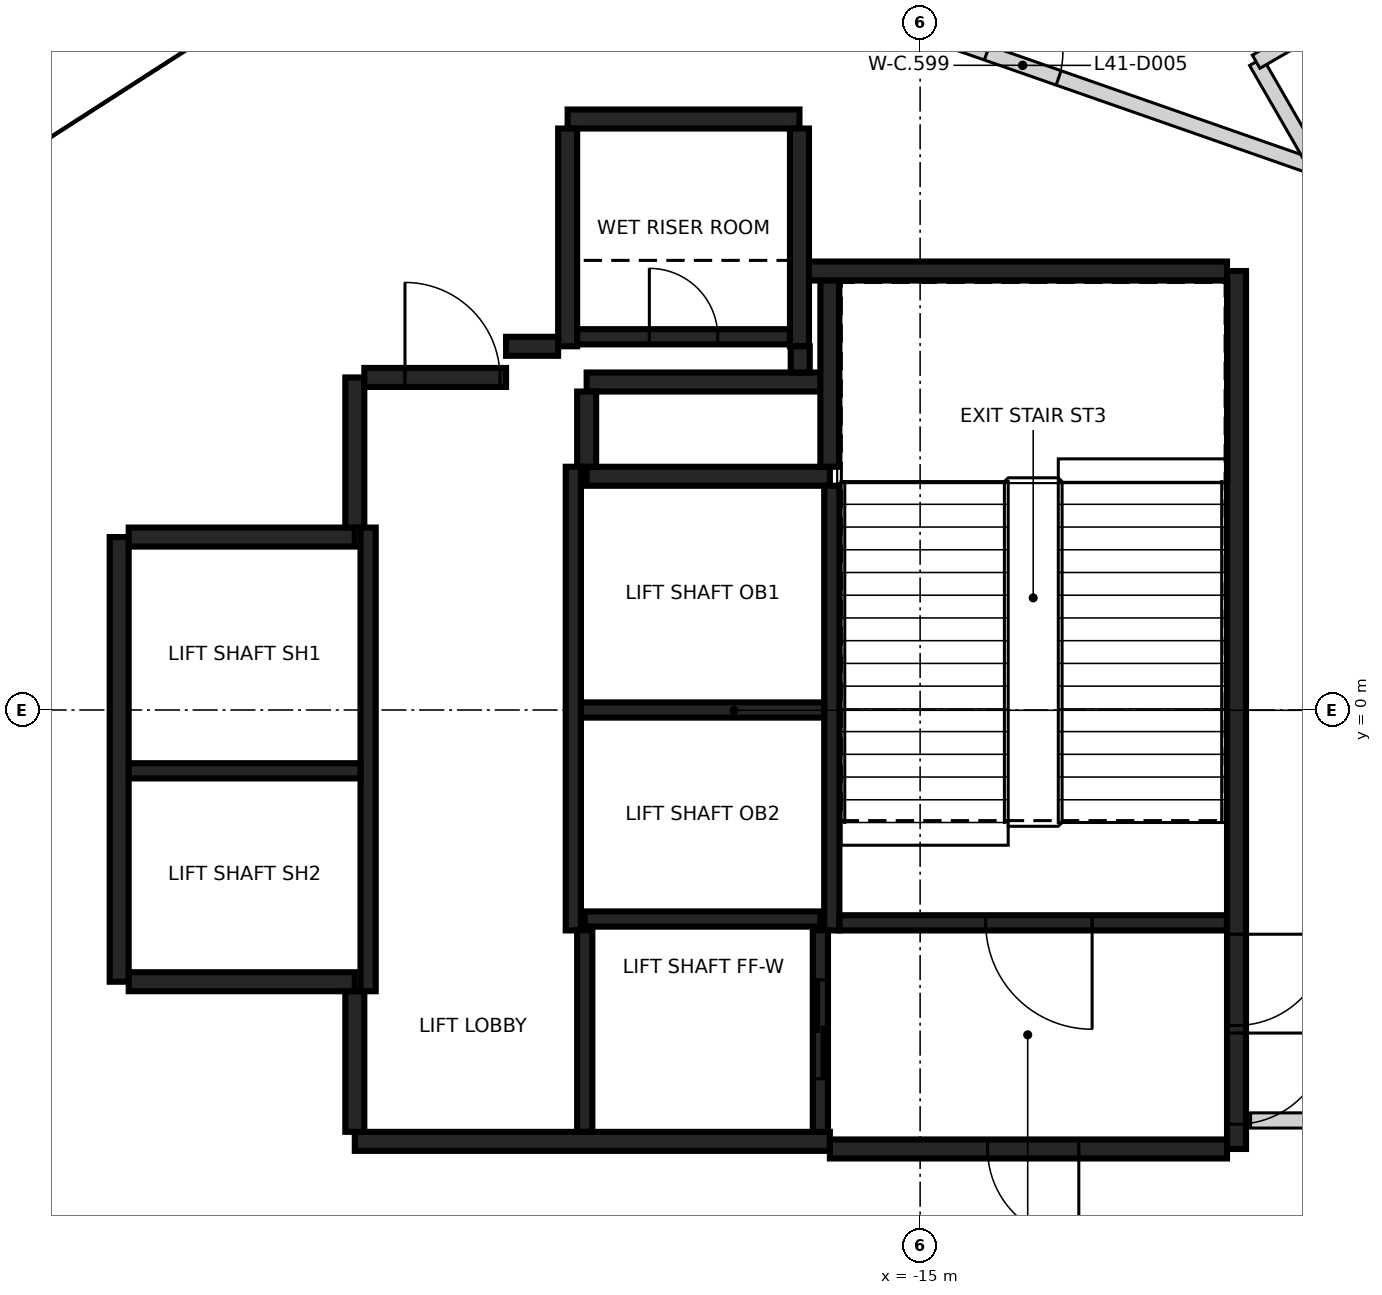
"""IFC4 building model, lengths in metres.
Left out: names, types, materials, properties, quantities, classifications, styles, units other than length and angle.
Written with IfcOpenShell. Run it as: python <this file> out.ifc"""

import sys

from ifc_helpers import new_model, si_unit, direction, frame, frame_2d, origin, place, context, subcontext, project, spatial, rectangle, extrude, element, fill, save


model = new_model("IFC4")
c1 = context("Model", 3, precision=1e-05, world=origin(), true_north=direction((0.0, 1.0)))
c2 = subcontext(c1, "Body", "Model", "MODEL_VIEW")
j1 = project(units=[si_unit("LENGTHUNIT", "METRE"), si_unit("PLANEANGLEUNIT", "RADIAN")], contexts=[c1])
p1 = place(None, origin())
s1 = spatial("IfcSite", under=j1, at=p1, CompositionType="ELEMENT")
p2 = place(p1, origin())
s2 = spatial("IfcBuilding", under=s1, at=p2, CompositionType="ELEMENT")
p3 = place(p2, frame((0.0, 0.0, 164.8)))
s3 = spatial("IfcBuildingStorey", under=s2, at=p3, CompositionType="ELEMENT", Elevation=164.8)
p4 = place(p3, frame((-10.837, 5.775, 0.0), z_axis=(0.0, 0.0, 1.0), x_axis=(0.0, -1.0, 0.0)))
e1 = element("IfcWall", 1, at=p4, inside=s3, PredefinedType="SHEAR", context=c2, shape_type="SweptSolid", body=[
    extrude(rectangle(XDim=11.55, YDim=0.25, at=frame_2d((5.775, 0.0))), origin(), (0.0, 0.0, 1.0), 4.45),
])
p5 = place(p4, frame((10.025, 0.0, 0.0)))
e2 = element("IfcOpeningElement", 2, at=p5, cuts=e1, PredefinedType="OPENING", context=c2, shape_type="SweptSolid", body=[
    extrude(rectangle(XDim=1.2, YDim=2.1, at=frame_2d((0.6, 1.05))), frame((0.0, 0.135, 0.0), z_axis=(0.0, -1.0, 0.0), x_axis=(1.0, 0.0, 0.0)), (0.0, 0.0, 1.0), 0.27),
])
p6 = place(p4, frame((8.725, 0.0, 0.0)))
e3 = element("IfcOpeningElement", 3, at=p6, cuts=e1, PredefinedType="OPENING", context=c2, shape_type="SweptSolid", body=[
    extrude(rectangle(XDim=1.2, YDim=2.1, at=frame_2d((0.6, 1.05))), frame((0.0, 0.135, 0.0), z_axis=(0.0, -1.0, 0.0), x_axis=(1.0, 0.0, 0.0)), (0.0, 0.0, 1.0), 0.27),
])
p7 = place(p3, frame((-16.187, -5.675, 0.0), z_axis=(0.0, 0.0, 1.0), x_axis=(-1.0, 0.0, 0.0)))
e4 = element("IfcWall", 4, at=p7, inside=s3, PredefinedType="SHEAR", context=c2, shape_type="SweptSolid", body=[
    extrude(rectangle(XDim=6.25, YDim=0.25, at=frame_2d((3.125, 0.0))), origin(), (0.0, 0.0, 1.0), 4.45),
])
p8 = place(p3, frame((-25.537, -3.575, 0.0), z_axis=(0.0, 0.0, 1.0), x_axis=(0.0, 1.0, 0.0)))
e5 = element("IfcWall", 5, at=p8, inside=s3, PredefinedType="SHEAR", context=c2, shape_type="SweptSolid", body=[
    extrude(rectangle(XDim=5.85, YDim=0.25, at=frame_2d((2.925, 0.0))), origin(), (0.0, 0.0, 1.0), 4.45),
])
p9 = place(p3, frame((-10.963, -5.775, 0.0), z_axis=(0.0, 0.0, 1.0), x_axis=(-1.0, 0.0, 0.0)))
e6 = element("IfcWall", 6, at=p9, inside=s3, PredefinedType="SHEAR", context=c2, shape_type="SweptSolid", body=[
    extrude(rectangle(XDim=5.225, YDim=0.25, at=frame_2d((2.612, 0.0))), origin(), (0.0, 0.0, 1.0), 4.45),
])
p10 = place(p9, frame((1.95, 0.0, 0.0)))
e7 = element("IfcOpeningElement", 7, at=p10, cuts=e6, PredefinedType="OPENING", context=c2, shape_type="SweptSolid", body=[
    extrude(rectangle(XDim=1.2, YDim=2.1, at=frame_2d((0.6, 1.05))), frame((0.0, 0.135, 0.0), z_axis=(0.0, -1.0, 0.0), x_axis=(1.0, 0.0, 0.0)), (0.0, 0.0, 1.0), 0.27),
])
p11 = place(p3, frame((-16.472, 5.775, 0.0), z_axis=(0.0, 0.0, 1.0), x_axis=(1.0, 0.0, 0.0)))
e8 = element("IfcWall", 8, at=p11, inside=s3, PredefinedType="SHEAR", context=c2, shape_type="SweptSolid", body=[
    extrude(rectangle(XDim=5.51, YDim=0.25, at=frame_2d((2.755, 0.0))), origin(), (0.0, 0.0, 1.0), 4.45),
])
p12 = place(p3, frame((-19.387, 3.075, 0.0), z_axis=(0.0, 0.0, 1.0), x_axis=(1.0, 0.0, 0.0)))
e9 = element("IfcWall", 9, at=p12, inside=s3, PredefinedType="SHEAR", context=c2, shape_type="SweptSolid", body=[
    extrude(rectangle(XDim=3.2, YDim=0.25, at=frame_2d((1.6, 0.0))), origin(), (0.0, 0.0, 1.0), 4.45),
])
for number, where, z_axis, x_axis in (
    (10, (-22.437, -3.575, 0.0), (0.0, 0.0, 1.0), (-1.0, 0.0, 0.0)),
    (11, (-25.412, 2.275, 0.0), (0.0, 0.0, 1.0), (1.0, 0.0, 0.0)),
):
    element("IfcWall", number, at=place(p3, frame(where, z_axis=z_axis, x_axis=x_axis)), inside=s3, PredefinedType="SHEAR", context=c2, shape_type="SweptSolid", body=[
        extrude(rectangle(XDim=2.975, YDim=0.25, at=frame_2d((1.487, 0.0))), origin(), (0.0, 0.0, 1.0), 4.45),
    ])
p13 = place(p3, frame((-19.637, 7.775, 0.0), z_axis=(0.0, 0.0, 1.0), x_axis=(1.0, 0.0, 0.0)))
e12 = element("IfcWall", 12, at=p13, inside=s3, PredefinedType="SHEAR", context=c2, shape_type="SweptSolid", body=[
    extrude(rectangle(XDim=3.05, YDim=0.25, at=frame_2d((1.525, 0.0))), origin(), (0.0, 0.0, 1.0), 4.45),
])
for number, where, z_axis, x_axis in (
    (13, (-16.587, 7.65, 0.0), (0.0, 0.0, 1.0), (0.0, -1.0, 0.0)),
    (14, (-19.637, 4.785, 0.0), (0.0, 0.0, 1.0), (0.0, 1.0, 0.0)),
):
    element("IfcWall", number, at=place(p3, frame(where, z_axis=z_axis, x_axis=x_axis)), inside=s3, PredefinedType="SHEAR", context=c2, shape_type="SweptSolid", body=[
        extrude(rectangle(XDim=2.865, YDim=0.25, at=frame_2d((1.432, 0.0))), origin(), (0.0, 0.0, 1.0), 4.45),
    ])
p14 = place(p3, frame((-16.302, 4.315, 0.0), z_axis=(0.0, 0.0, 1.0), x_axis=(-1.0, 0.0, 0.0)))
e15 = element("IfcWall", 15, at=p14, inside=s3, PredefinedType="SHEAR", context=c2, shape_type="SweptSolid", body=[
    extrude(rectangle(XDim=3.085, YDim=0.25, at=frame_2d((1.542, 0.0))), origin(), (0.0, 0.0, 1.0), 4.45),
])
p15 = place(p3, frame((-16.187, 3.2, 0.0), z_axis=(0.0, 0.0, 1.0), x_axis=(0.0, 1.0, 0.0)))
e16 = element("IfcWall", 16, at=p15, inside=s3, PredefinedType="SHEAR", context=c2, shape_type="SweptSolid", body=[
    extrude(rectangle(XDim=2.449, YDim=0.25, at=frame_2d((1.225, 0.0))), origin(), (0.0, 0.0, 1.0), 4.45),
])
p16 = place(p3, frame((-22.437, 2.4, 0.0), z_axis=(0.0, 0.0, 1.0), x_axis=(0.0, 1.0, 0.0)))
e17 = element("IfcWall", 17, at=p16, inside=s3, PredefinedType="SHEAR", context=c2, shape_type="SweptSolid", body=[
    extrude(rectangle(XDim=1.975, YDim=0.25, at=frame_2d((0.987, 0.0))), origin(), (0.0, 0.0, 1.0), 4.45),
])
p17 = place(p3, frame((-22.437, -5.55, 0.0), z_axis=(0.0, 0.0, 1.0), x_axis=(0.0, 1.0, 0.0)))
e18 = element("IfcWall", 18, at=p17, inside=s3, PredefinedType="SHEAR", context=c2, shape_type="SweptSolid", body=[
    extrude(rectangle(XDim=1.849, YDim=0.25, at=frame_2d((0.925, 0.0))), origin(), (0.0, 0.0, 1.0), 4.45),
])
p18 = place(p3, frame((-22.312, 4.375, 0.0), z_axis=(0.0, 0.0, 1.0), x_axis=(1.0, 0.0, 0.0)))
e19 = element("IfcWall", 19, at=p18, inside=s3, PredefinedType="SHEAR", context=c2, shape_type="SweptSolid", body=[
    extrude(rectangle(XDim=1.865, YDim=0.25, at=frame_2d((0.932, 0.0))), origin(), (0.0, 0.0, 1.0), 4.45),
])
p19 = place(p18, frame((0.535, 0.0, 0.0)))
e20 = element("IfcOpeningElement", 20, at=p19, cuts=e19, PredefinedType="OPENING", context=c2, shape_type="SweptSolid", body=[
    extrude(rectangle(XDim=1.25, YDim=2.1, at=frame_2d((0.625, 1.05))), frame((0.0, 0.135, 0.0), z_axis=(0.0, -1.0, 0.0), x_axis=(1.0, 0.0, 0.0)), (0.0, 0.0, 1.0), 0.27),
])
p20 = place(p3, frame((-19.387, 4.19, 0.0), z_axis=(0.0, 0.0, 1.0), x_axis=(0.0, -1.0, 0.0)))
e21 = element("IfcWall", 21, at=p20, inside=s3, PredefinedType="SHEAR", context=c2, shape_type="SweptSolid", body=[
    extrude(rectangle(XDim=0.989, YDim=0.25, at=frame_2d((0.495, 0.0))), origin(), (0.0, 0.0, 1.0), 4.45),
])
p21 = place(p3, frame((-20.447, 4.785, 0.0), z_axis=(0.0, 0.0, 1.0), x_axis=(1.0, 0.0, 0.0)))
e22 = element("IfcWall", 22, at=p21, inside=s3, PredefinedType="SHEAR", context=c2, shape_type="SweptSolid", body=[
    extrude(rectangle(XDim=0.685, YDim=0.25, at=frame_2d((0.342, 0.0))), origin(), (0.0, 0.0, 1.0), 4.45),
])
p22 = place(p3, frame((-16.577, 4.785, 0.0), z_axis=(0.0, 0.0, 1.0), x_axis=(0.0, -1.0, 0.0)))
e23 = element("IfcWall", 23, at=p22, inside=s3, PredefinedType="SHEAR", context=c2, shape_type="SweptSolid", body=[
    extrude(rectangle(XDim=0.344, YDim=0.25, at=frame_2d((0.172, 0.0))), origin(), (0.0, 0.0, 1.0), 4.45),
])
p23 = place(p3, frame((-16.162, 2.951, 0.0), z_axis=(0.0, 0.0, 1.0), x_axis=(0.0, -1.0, 0.0)))
e24 = element("IfcWall", 24, at=p23, inside=s3, PredefinedType="SHEAR", context=c2, shape_type="SweptSolid", body=[
    extrude(rectangle(XDim=5.851, YDim=0.2, at=frame_2d((2.925, 0.0))), origin(), (0.0, 0.0, 1.0), 4.45),
])
for number, where, z_axis, x_axis in (
    (25, (-19.562, -2.9, 0.0), (0.0, 0.0, 1.0), (0.0, 1.0, 0.0)),
    (26, (-22.262, 2.4, 0.0), (0.0, 0.0, 1.0), (0.0, -1.0, 0.0)),
):
    element("IfcWall", number, at=place(p3, frame(where, z_axis=z_axis, x_axis=x_axis)), inside=s3, PredefinedType="SHEAR", context=c2, shape_type="SweptSolid", body=[
        extrude(rectangle(XDim=6.1, YDim=0.2, at=frame_2d((3.05, 0.0))), origin(), (0.0, 0.0, 1.0), 4.45),
    ])
p24 = place(p3, frame((-10.963, -2.8, 0.0), z_axis=(0.0, 0.0, 1.0), x_axis=(-1.0, 0.0, 0.0)))
e27 = element("IfcWall", 27, at=p24, inside=s3, PredefinedType="SHEAR", context=c2, shape_type="SweptSolid", body=[
    extrude(rectangle(XDim=5.098, YDim=0.2, at=frame_2d((2.549, 0.0))), origin(), (0.0, 0.0, 1.0), 4.45),
])
p25 = place(p24, frame((1.774, 0.0, 0.0)))
e28 = element("IfcOpeningElement", 28, at=p25, cuts=e27, PredefinedType="OPENING", context=c2, shape_type="SweptSolid", body=[
    extrude(rectangle(XDim=1.4, YDim=2.1, at=frame_2d((0.7, 1.05))), frame((0.0, 0.11, 0.0), z_axis=(0.0, -1.0, 0.0), x_axis=(1.0, 0.0, 0.0)), (0.0, 0.0, 1.0), 0.22),
])
p26 = place(p3, frame((-16.263, 0.0, 0.0), z_axis=(0.0, 0.0, 1.0), x_axis=(-1.0, 0.0, 0.0)))
e29 = element("IfcWall", 29, at=p26, inside=s3, PredefinedType="SHEAR", context=c2, shape_type="SweptSolid", body=[
    extrude(rectangle(XDim=3.198, YDim=0.2, at=frame_2d((1.599, 0.0))), origin(), (0.0, 0.0, 1.0), 4.45),
])
p27 = place(p3, frame((-22.363, -0.8, 0.0), z_axis=(0.0, 0.0, 1.0), x_axis=(-1.0, 0.0, 0.0)))
e30 = element("IfcWall", 30, at=p27, inside=s3, PredefinedType="SHEAR", context=c2, shape_type="SweptSolid", body=[
    extrude(rectangle(XDim=3.048, YDim=0.2, at=frame_2d((1.524, 0.0))), origin(), (0.0, 0.0, 1.0), 4.45),
])
p28 = place(p3, frame((-19.511, 4.91, 0.0), z_axis=(0.0, 0.0, 1.0), x_axis=(1.0, 0.0, 0.0)))
e31 = element("IfcWall", 31, at=p28, inside=s3, PredefinedType="SHEAR", context=c2, shape_type="SweptSolid", body=[
    extrude(rectangle(XDim=2.798, YDim=0.2, at=frame_2d((1.399, 0.0))), origin(), (0.0, 0.0, 1.0), 4.45),
])
p29 = place(p28, frame((0.949, 0.0, 0.0)))
e32 = element("IfcOpeningElement", 32, at=p29, cuts=e31, PredefinedType="OPENING", context=c2, shape_type="SweptSolid", body=[
    extrude(rectangle(XDim=0.9, YDim=2.1, at=frame_2d((0.45, 1.05))), frame((0.0, 0.11, 0.0), z_axis=(0.0, -1.0, 0.0), x_axis=(1.0, 0.0, 0.0)), (0.0, 0.0, 1.0), 0.22),
])
p30 = place(p3, frame((-19.412, -2.75, 0.0), z_axis=(0.0, 0.0, 1.0), x_axis=(1.0, 0.0, 0.0)))
e33 = element("IfcWall", 33, at=p30, inside=s3, PredefinedType="SHEAR", context=c2, shape_type="SweptSolid", body=[
    extrude(rectangle(XDim=3.1, YDim=0.2, at=frame_2d((1.55, 0.0))), origin(), (0.0, 0.0, 1.0), 4.45),
])
p31 = place(p3, frame((-16.312, -2.898, 0.0), z_axis=(0.0, 0.0, 1.0), x_axis=(0.0, -1.0, 0.0)))
e34 = element("IfcWall", 34, at=p31, inside=s3, PredefinedType="SHEAR", context=c2, shape_type="SweptSolid", body=[
    extrude(rectangle(XDim=2.651, YDim=0.2, at=frame_2d((1.325, 0.0))), origin(), (0.0, 0.0, 1.0), 4.45),
])
p32 = place(p31, frame((0.652, 0.0, 0.0)))
e35 = element("IfcOpeningElement", 35, at=p32, cuts=e34, PredefinedType="OPENING", context=c2, shape_type="SweptSolid", body=[
    extrude(rectangle(XDim=1.3, YDim=2.1, at=frame_2d((0.65, 1.05))), frame((0.0, 0.11, 0.0), z_axis=(0.0, -1.0, 0.0), x_axis=(1.0, 0.0, 0.0)), (0.0, 0.0, 1.0), 0.22),
])
p33 = place(p3, frame((-19.412, -5.549, 0.0), z_axis=(0.0, 0.0, 1.0), x_axis=(0.0, 1.0, 0.0)))
e36 = element("IfcWall", 36, at=p33, inside=s3, PredefinedType="SHEAR", context=c2, shape_type="SweptSolid", body=[
    extrude(rectangle(XDim=2.651, YDim=0.2, at=frame_2d((1.325, 0.0))), origin(), (0.0, 0.0, 1.0), 4.45),
])
p34 = place(p3, frame((-17.536, 9.838, 0.0), z_axis=(0.0, 0.0, 1.0), x_axis=(0.944066821922, -0.329754205048, 0.0)))
e37 = element("IfcWall", 37, at=p34, inside=s3, PredefinedType="PARTITIONING", context=c2, shape_type="SweptSolid", body=[
    extrude(rectangle(XDim=8.227, YDim=0.2, at=frame_2d((4.114, 0.0))), origin(), (0.0, 0.0, 1.0), 4.45),
])
p35 = place(p34, frame((3.616, 0.0, 0.0)))
e38 = element("IfcOpeningElement", 38, at=p35, cuts=e37, PredefinedType="OPENING", context=c2, shape_type="SweptSolid", body=[
    extrude(rectangle(XDim=1.0, YDim=2.1, at=frame_2d((0.5, 1.05))), frame((0.0, 0.11, 0.0), z_axis=(0.0, -1.0, 0.0), x_axis=(1.0, 0.0, 0.0)), (0.0, 0.0, 1.0), 0.22),
])
p36 = place(p3, frame((-10.652, -5.4, 0.0), z_axis=(0.0, 0.0, 1.0), x_axis=(1.0, 0.0, 0.0)))
e39 = element("IfcWall", 39, at=p36, inside=s3, PredefinedType="PARTITIONING", context=c2, shape_type="SweptSolid", body=[
    extrude(rectangle(XDim=2.083, YDim=0.2, at=frame_2d((1.042, 0.0))), origin(), (0.0, 0.0, 1.0), 4.45),
])
p37 = place(p3, frame((-10.579, 8.529, 0.0), z_axis=(0.0, 0.0, 1.0), x_axis=(0.498775127666, -0.866731430157, 0.0)))
e40 = element("IfcWall", 40, at=p37, inside=s3, PredefinedType="PARTITIONING", context=c2, shape_type="SweptSolid", body=[
    extrude(rectangle(XDim=1.614, YDim=0.2, at=frame_2d((0.807, 0.0))), origin(), (0.0, 0.0, 1.0), 4.45),
])
p38 = place(p3, frame((-10.579, 8.529, 0.0), z_axis=(0.0, 0.0, 1.0), x_axis=(0.866034354261, 0.499984496999, 0.0)))
e41 = element("IfcWall", 41, at=p38, inside=s3, PredefinedType="PARTITIONING", context=c2, shape_type="SweptSolid", body=[
    extrude(rectangle(XDim=6.398, YDim=0.2, at=frame_2d((3.199, 0.0))), origin(), (0.0, 0.0, 1.0), 4.45),
])
p39 = place(p32, origin())
e42 = element("IfcDoor", 42, at=p39, inside=s3, OperationType="SLIDING_TO_RIGHT", PredefinedType="DOOR", context=c2, shape_type="SweptSolid", body=[
    extrude(rectangle(XDim=1.3, YDim=2.1, at=frame_2d((0.65, 1.05))), frame((0.0, 0.025, 0.0), z_axis=(0.0, -1.0, 0.0), x_axis=(1.0, 0.0, 0.0)), (0.0, 0.0, 1.0), 0.05),
])
fill(e35, e42)
p40 = place(p19, origin())
e43 = element("IfcDoor", 43, at=p40, inside=s3, OperationType="SINGLE_SWING_LEFT", PredefinedType="DOOR", context=c2, shape_type="SweptSolid", body=[
    extrude(rectangle(XDim=1.25, YDim=2.1, at=frame_2d((0.625, 1.05))), frame((0.0, 0.025, 0.0), z_axis=(0.0, -1.0, 0.0), x_axis=(1.0, 0.0, 0.0)), (0.0, 0.0, 1.0), 0.05),
])
fill(e20, e43)
p41 = place(p5, origin())
e44 = element("IfcDoor", 44, at=p41, inside=s3, OperationType="SINGLE_SWING_LEFT", PredefinedType="DOOR", context=c2, shape_type="SweptSolid", body=[
    extrude(rectangle(XDim=1.2, YDim=2.1, at=frame_2d((0.6, 1.05))), frame((0.0, 0.025, 0.0), z_axis=(0.0, -1.0, 0.0), x_axis=(1.0, 0.0, 0.0)), (0.0, 0.0, 1.0), 0.05),
])
fill(e2, e44)
p42 = place(p6, origin())
e45 = element("IfcDoor", 45, at=p42, inside=s3, OperationType="SINGLE_SWING_RIGHT", PredefinedType="DOOR", context=c2, shape_type="SweptSolid", body=[
    extrude(rectangle(XDim=1.2, YDim=2.1, at=frame_2d((0.6, 1.05))), frame((0.0, 0.025, 0.0), z_axis=(0.0, -1.0, 0.0), x_axis=(1.0, 0.0, 0.0)), (0.0, 0.0, 1.0), 0.05),
])
fill(e3, e45)
p43 = place(p25, origin())
e46 = element("IfcDoor", 46, at=p43, inside=s3, OperationType="SINGLE_SWING_RIGHT", PredefinedType="DOOR", context=c2, shape_type="SweptSolid", body=[
    extrude(rectangle(XDim=1.4, YDim=2.1, at=frame_2d((0.7, 1.05))), frame((0.0, 0.025, 0.0), z_axis=(0.0, -1.0, 0.0), x_axis=(1.0, 0.0, 0.0)), (0.0, 0.0, 1.0), 0.05),
])
fill(e28, e46)
p44 = place(p29, origin())
e47 = element("IfcDoor", 47, at=p44, inside=s3, OperationType="SINGLE_SWING_LEFT", PredefinedType="DOOR", context=c2, shape_type="SweptSolid", body=[
    extrude(rectangle(XDim=0.9, YDim=2.1, at=frame_2d((0.45, 1.05))), frame((0.0, 0.025, 0.0), z_axis=(0.0, -1.0, 0.0), x_axis=(1.0, 0.0, 0.0)), (0.0, 0.0, 1.0), 0.05),
])
fill(e32, e47)
p45 = place(p10, origin())
e48 = element("IfcDoor", 48, at=p45, inside=s3, OperationType="SINGLE_SWING_LEFT", PredefinedType="DOOR", context=c2, shape_type="SweptSolid", body=[
    extrude(rectangle(XDim=1.2, YDim=2.1, at=frame_2d((0.6, 1.05))), frame((0.0, 0.025, 0.0), z_axis=(0.0, -1.0, 0.0), x_axis=(1.0, 0.0, 0.0)), (0.0, 0.0, 1.0), 0.05),
])
fill(e7, e48)
p46 = place(p35, origin())
e49 = element("IfcDoor", 49, at=p46, inside=s3, OperationType="SINGLE_SWING_LEFT", PredefinedType="DOOR", context=c2, shape_type="SweptSolid", body=[
    extrude(rectangle(XDim=1.0, YDim=2.1, at=frame_2d((0.5, 1.05))), frame((0.0, 0.025, 0.0), z_axis=(0.0, -1.0, 0.0), x_axis=(1.0, 0.0, 0.0)), (0.0, 0.0, 1.0), 0.05),
])
fill(e38, e49)
save(model, sys.argv[1])
